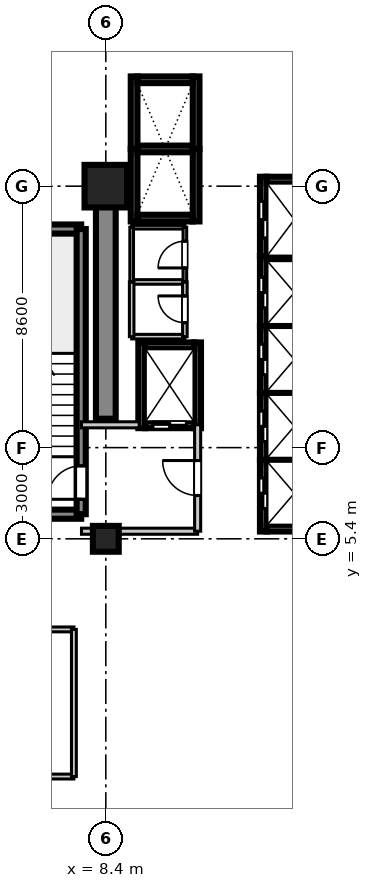
"""IFC4 building model, lengths in metres.
Left out: names, types, materials, properties, quantities, classifications, styles, units other than length and angle.
Written with IfcOpenShell. Run it as: python <this file> out.ifc"""

import sys

from ifc_helpers import new_model, si_unit, direction, frame, frame_2d, origin, origin_2d, place, context, subcontext, project, spatial, rectangle, extrude, source, transform, mapped, element, fill, save


model = new_model("IFC4")
c1 = context("Model", 3, precision=1e-05, world=origin(), true_north=direction((0.0, 1.0)))
c2 = subcontext(c1, "Body", "Model", "MODEL_VIEW")
j1 = project(units=[si_unit("LENGTHUNIT", "METRE"), si_unit("PLANEANGLEUNIT", "RADIAN")], contexts=[c1])
p1 = place(None, origin())
s1 = spatial("IfcSite", under=j1, at=p1, CompositionType="ELEMENT")
p2 = place(p1, origin())
s2 = spatial("IfcBuilding", under=s1, at=p2, CompositionType="ELEMENT")
p3 = place(p2, frame((0.0, 0.0, 39.7)))
s3 = spatial("IfcBuildingStorey", under=s2, at=p3, CompositionType="ELEMENT", Elevation=39.7)
m1 = source(origin(), c2, "Body", "SweptSolid", [
    extrude(rectangle(XDim=0.85, YDim=0.85, at=origin_2d()), origin(), (0.0, 0.0, 1.0), 3.605),
])
p4 = place(p3, frame((8.4, 5.4, 0.0), z_axis=(0.0, 0.0, 1.0), x_axis=(1.0, 0.0, 0.0)))
e1 = element("IfcColumn", 1, at=p4, inside=s3, PredefinedType="PILASTER", context=c2, shape_type="MappedRepresentation", body=[
    mapped(m1, transform((0.0, 0.0, 0.0), scale=1.0)),
])
m2 = source(origin(), c2, "Body", "SweptSolid", [
    extrude(rectangle(XDim=1.4, YDim=1.4, at=origin_2d()), origin(), (0.0, 0.0, 1.0), 3.605),
])
p5 = place(p3, frame((8.4, 17.0, 0.0), z_axis=(0.0, 0.0, 1.0), x_axis=(1.0, 0.0, 0.0)))
e2 = element("IfcColumn", 2, at=p5, inside=s3, PredefinedType="COLUMN", context=c2, shape_type="MappedRepresentation", body=[
    mapped(m2, transform((0.0, 0.0, 0.0), scale=1.0)),
])
m3 = source(origin(), c2, "Body", "SweptSolid", [
    extrude(rectangle(XDim=7.65, YDim=0.65, at=frame_2d((3.825, 0.0))), origin(), (0.0, 0.0, 1.0), 3.37),
])
p6 = place(p3, frame((8.4, 9.35, 0.0), z_axis=(0.0, 0.0, 1.0), x_axis=(0.0, 1.0, 0.0)))
e3 = element("IfcWall", 3, at=p6, inside=s3, PredefinedType="SHEAR", context=c2, shape_type="MappedRepresentation", body=[
    mapped(m3, transform((0.0, 0.0, 0.0), scale=1.0)),
])
m4 = source(origin(), c2, "Body", "SweptSolid", [
    extrude(rectangle(XDim=3.98, YDim=0.3, at=frame_2d((1.99, 0.0))), origin(), (0.0, 0.0, 1.0), 3.37),
])
for number, where, z_axis, x_axis in (
    (4, (3.61, 6.21, 0.0), (0.0, 0.0, 1.0), (1.0, 0.0, 0.0)),
    (5, (3.61, 15.59, 0.0), (0.0, 0.0, 1.0), (1.0, 0.0, 0.0)),
):
    element("IfcWall", number, at=place(p3, frame(where, z_axis=z_axis, x_axis=x_axis)), inside=s3, PredefinedType="SHEAR", context=c2, shape_type="MappedRepresentation", body=[
        mapped(m4, transform((0.0, 0.0, 0.0), scale=1.0)),
    ])
m5 = source(origin(), c2, "Body", "SweptSolid", [
    extrude(rectangle(XDim=9.38, YDim=0.3, at=frame_2d((4.69, 0.0))), origin(), (0.0, 0.0, 1.0), 3.37),
])
p7 = place(p3, frame((7.59, 6.21, 0.0), z_axis=(0.0, 0.0, 1.0), x_axis=(0.0, 1.0, 0.0)))
e6 = element("IfcWall", 6, at=p7, inside=s3, PredefinedType="SHEAR", context=c2, shape_type="MappedRepresentation", body=[
    mapped(m5, transform((0.0, 0.0, 0.0), scale=1.0)),
])
p8 = place(p7, frame((0.49, 0.0, 0.0)))
e7 = element("IfcOpeningElement", 7, at=p8, cuts=e6, PredefinedType="OPENING", context=c2, shape_type="SweptSolid", body=[
    extrude(rectangle(XDim=1.1, YDim=2.15, at=frame_2d((0.55, 1.075))), frame((0.0, 0.16, 0.0), z_axis=(0.0, -1.0, 0.0), x_axis=(1.0, 0.0, 0.0)), (0.0, 0.0, 1.0), 0.32),
])
m6 = source(origin(), c2, "Body", "SweptSolid", [
    extrude(rectangle(XDim=2.36, YDim=0.22, at=frame_2d((1.18, 0.0))), origin(), (0.0, 0.0, 1.0), 3.37),
])
p9 = place(p3, frame((13.58, 5.64, 0.0), z_axis=(0.0, 0.0, 1.0), x_axis=(0.0, 1.0, 0.0)))
e8 = element("IfcWall", 8, at=p9, inside=s3, PredefinedType="SHEAR", context=c2, shape_type="MappedRepresentation", body=[
    mapped(m6, transform((0.0, 0.0, 0.0), scale=1.0)),
])
p10 = place(p9, frame((0.76, 0.0, 0.0)))
e9 = element("IfcOpeningElement", 9, at=p10, cuts=e8, PredefinedType="OPENING", context=c2, shape_type="SweptSolid", body=[
    extrude(rectangle(XDim=1.0, YDim=2.2, at=frame_2d((0.5, 1.1))), frame((0.0, 0.12, 0.0), z_axis=(0.0, -1.0, 0.0), x_axis=(1.0, 0.0, 0.0)), (0.0, 0.0, 1.0), 0.24),
])
m7 = source(origin(), c2, "Body", "SweptSolid", [
    extrude(rectangle(XDim=1.82, YDim=0.22, at=frame_2d((0.91, 0.0))), origin(), (0.0, 0.0, 1.0), 3.37),
])
p11 = place(p3, frame((13.69, 5.75, 0.0), z_axis=(0.0, 0.0, 1.0), x_axis=(1.0, 0.0, 0.0)))
e10 = element("IfcWall", 10, at=p11, inside=s3, PredefinedType="SHEAR", context=c2, shape_type="MappedRepresentation", body=[
    mapped(m7, transform((0.0, 0.0, 0.0), scale=1.0)),
])
m8 = source(origin(), c2, "Body", "SweptSolid", [
    extrude(rectangle(XDim=1.82, YDim=0.22, at=frame_2d((0.91, 0.0))), origin(), (0.0, 0.0, 1.0), 3.65),
])
p12 = place(p3, frame((13.69, 8.0, 0.0), z_axis=(0.0, 0.0, 1.0), x_axis=(1.0, 0.0, 0.0)))
e11 = element("IfcWall", 11, at=p12, inside=s3, PredefinedType="SHEAR", context=c2, shape_type="MappedRepresentation", body=[
    mapped(m8, transform((0.0, 0.0, 0.0), scale=1.0)),
])
m9 = source(origin(), c2, "Body", "SweptSolid", [
    extrude(rectangle(XDim=2.2, YDim=0.22, at=frame_2d((1.1, 0.0))), origin(), (0.0, 0.0, 1.0), 3.37),
])
p13 = place(p3, frame((13.58, 8.0, 0.0), z_axis=(0.0, 0.0, 1.0), x_axis=(0.0, 1.0, 0.0)))
e12 = element("IfcWall", 12, at=p13, inside=s3, PredefinedType="SHEAR", context=c2, shape_type="MappedRepresentation", body=[
    mapped(m9, transform((0.0, 0.0, 0.0), scale=1.0)),
])
p14 = place(p13, frame((0.6, 0.0, 0.0)))
e13 = element("IfcOpeningElement", 13, at=p14, cuts=e12, PredefinedType="OPENING", context=c2, shape_type="SweptSolid", body=[
    extrude(rectangle(XDim=1.0, YDim=2.2, at=frame_2d((0.5, 1.1))), frame((0.0, 0.12, 0.0), z_axis=(0.0, -1.0, 0.0), x_axis=(1.0, 0.0, 0.0)), (0.0, 0.0, 1.0), 0.24),
])
p15 = place(p3, frame((13.69, 10.2, 0.0), z_axis=(0.0, 0.0, 1.0), x_axis=(1.0, 0.0, 0.0)))
e14 = element("IfcWall", 14, at=p15, inside=s3, PredefinedType="SHEAR", context=c2, shape_type="MappedRepresentation", body=[
    mapped(m8, transform((0.0, 0.0, 0.0), scale=1.0)),
])
p16 = place(p3, frame((13.58, 10.2, 0.0), z_axis=(0.0, 0.0, 1.0), x_axis=(0.0, 1.0, 0.0)))
e15 = element("IfcWall", 15, at=p16, inside=s3, PredefinedType="SHEAR", context=c2, shape_type="MappedRepresentation", body=[
    mapped(m9, transform((0.0, 0.0, 0.0), scale=1.0)),
])
p17 = place(p16, frame((0.6, 0.0, 0.0)))
e16 = element("IfcOpeningElement", 16, at=p17, cuts=e15, PredefinedType="OPENING", context=c2, shape_type="SweptSolid", body=[
    extrude(rectangle(XDim=1.0, YDim=2.2, at=frame_2d((0.5, 1.1))), frame((0.0, 0.12, 0.0), z_axis=(0.0, -1.0, 0.0), x_axis=(1.0, 0.0, 0.0)), (0.0, 0.0, 1.0), 0.24),
])
p18 = place(p3, frame((13.69, 12.4, 0.0), z_axis=(0.0, 0.0, 1.0), x_axis=(1.0, 0.0, 0.0)))
e17 = element("IfcWall", 17, at=p18, inside=s3, PredefinedType="SHEAR", context=c2, shape_type="MappedRepresentation", body=[
    mapped(m8, transform((0.0, 0.0, 0.0), scale=1.0)),
])
m10 = source(origin(), c2, "Body", "SweptSolid", [
    extrude(rectangle(XDim=2.3, YDim=0.22, at=frame_2d((1.15, 0.0))), origin(), (0.0, 0.0, 1.0), 3.37),
])
p19 = place(p3, frame((13.58, 12.4, 0.0), z_axis=(0.0, 0.0, 1.0), x_axis=(0.0, 1.0, 0.0)))
e18 = element("IfcWall", 18, at=p19, inside=s3, PredefinedType="SHEAR", context=c2, shape_type="MappedRepresentation", body=[
    mapped(m10, transform((0.0, 0.0, 0.0), scale=1.0)),
])
p20 = place(p19, frame((0.6, 0.0, 0.0)))
e19 = element("IfcOpeningElement", 19, at=p20, cuts=e18, PredefinedType="OPENING", context=c2, shape_type="SweptSolid", body=[
    extrude(rectangle(XDim=1.0, YDim=2.2, at=frame_2d((0.5, 1.1))), frame((0.0, 0.12, 0.0), z_axis=(0.0, -1.0, 0.0), x_axis=(1.0, 0.0, 0.0)), (0.0, 0.0, 1.0), 0.24),
])
p21 = place(p3, frame((13.69, 14.7, 0.0), z_axis=(0.0, 0.0, 1.0), x_axis=(1.0, 0.0, 0.0)))
e20 = element("IfcWall", 20, at=p21, inside=s3, PredefinedType="SHEAR", context=c2, shape_type="MappedRepresentation", body=[
    mapped(m8, transform((0.0, 0.0, 0.0), scale=1.0)),
])
m11 = source(origin(), c2, "Body", "SweptSolid", [
    extrude(rectangle(XDim=2.385, YDim=0.22, at=frame_2d((1.192, 0.0))), origin(), (0.0, 0.0, 1.0), 3.37),
])
for number, where, z_axis, x_axis in (
    (21, (9.33, 15.84, 0.0), (0.0, 0.0, 1.0), (0.0, 1.0, 0.0)),
    (22, (11.37, 15.84, 0.0), (0.0, 0.0, 1.0), (0.0, 1.0, 0.0)),
):
    element("IfcWall", number, at=place(p3, frame(where, z_axis=z_axis, x_axis=x_axis)), inside=s3, PredefinedType="SHEAR", context=c2, shape_type="MappedRepresentation", body=[
        mapped(m11, transform((0.0, 0.0, 0.0), scale=1.0)),
    ])
p22 = place(p3, frame((9.44, 15.95, 0.0), z_axis=(0.0, 0.0, 1.0), x_axis=(1.0, 0.0, 0.0)))
e23 = element("IfcWall", 23, at=p22, inside=s3, PredefinedType="SHEAR", context=c2, shape_type="MappedRepresentation", body=[
    mapped(m7, transform((0.0, 0.0, 0.0), scale=1.0)),
])
p23 = place(p3, frame((9.44, 18.225, 0.0), z_axis=(0.0, 0.0, 1.0), x_axis=(1.0, 0.0, 0.0)))
e24 = element("IfcWall", 24, at=p23, inside=s3, PredefinedType="SHEAR", context=c2, shape_type="MappedRepresentation", body=[
    mapped(m8, transform((0.0, 0.0, 0.0), scale=1.0)),
])
for number, where, z_axis, x_axis in (
    (25, (9.33, 18.225, 0.0), (0.0, 0.0, 1.0), (0.0, 1.0, 0.0)),
    (26, (11.37, 18.225, 0.0), (0.0, 0.0, 1.0), (0.0, 1.0, 0.0)),
):
    element("IfcWall", number, at=place(p3, frame(where, z_axis=z_axis, x_axis=x_axis)), inside=s3, PredefinedType="SHEAR", context=c2, shape_type="MappedRepresentation", body=[
        mapped(m11, transform((0.0, 0.0, 0.0), scale=1.0)),
    ])
p24 = place(p3, frame((9.44, 20.5, 0.0), z_axis=(0.0, 0.0, 1.0), x_axis=(1.0, 0.0, 0.0)))
e27 = element("IfcWall", 27, at=p24, inside=s3, PredefinedType="SHEAR", context=c2, shape_type="MappedRepresentation", body=[
    mapped(m7, transform((0.0, 0.0, 0.0), scale=1.0)),
])
m12 = source(origin(), c2, "Body", "SweptSolid", [
    extrude(rectangle(XDim=2.82, YDim=0.22, at=frame_2d((1.41, 0.0))), origin(), (0.0, 0.0, 1.0), 3.37),
])
for number, where, z_axis, x_axis in (
    (28, (9.58, 9.04, 0.0), (0.0, 0.0, 1.0), (0.0, 1.0, 0.0)),
    (29, (11.42, 9.04, 0.0), (0.0, 0.0, 1.0), (0.0, 1.0, 0.0)),
):
    element("IfcWall", number, at=place(p3, frame(where, z_axis=z_axis, x_axis=x_axis)), inside=s3, PredefinedType="SHEAR", context=c2, shape_type="MappedRepresentation", body=[
        mapped(m12, transform((0.0, 0.0, 0.0), scale=1.0)),
    ])
m13 = source(origin(), c2, "Body", "SweptSolid", [
    extrude(rectangle(XDim=1.62, YDim=0.22, at=frame_2d((0.81, 0.0))), origin(), (0.0, 0.0, 1.0), 3.37),
])
p25 = place(p3, frame((9.69, 9.15, 0.0), z_axis=(0.0, 0.0, 1.0), x_axis=(1.0, 0.0, 0.0)))
e30 = element("IfcWall", 30, at=p25, inside=s3, PredefinedType="SHEAR", context=c2, shape_type="MappedRepresentation", body=[
    mapped(m13, transform((0.0, 0.0, 0.0), scale=1.0)),
])
p26 = place(p25, frame((0.26, 0.0, 0.0)))
e31 = element("IfcOpeningElement", 31, at=p26, cuts=e30, PredefinedType="OPENING", context=c2, shape_type="SweptSolid", body=[
    extrude(rectangle(XDim=1.1, YDim=2.2, at=frame_2d((0.55, 1.1))), frame((0.0, 0.12, 0.0), z_axis=(0.0, -1.0, 0.0), x_axis=(1.0, 0.0, 0.0)), (0.0, 0.0, 1.0), 0.24),
])
p27 = place(p3, frame((9.69, 11.75, 0.0), z_axis=(0.0, 0.0, 1.0), x_axis=(1.0, 0.0, 0.0)))
e32 = element("IfcWall", 32, at=p27, inside=s3, PredefinedType="SHEAR", context=c2, shape_type="MappedRepresentation", body=[
    mapped(m13, transform((0.0, 0.0, 0.0), scale=1.0)),
])
m14 = source(origin(), c2, "Body", "SweptSolid", [
    extrude(rectangle(XDim=2.61, YDim=0.22, at=frame_2d((1.305, 0.0))), origin(), (0.0, 0.0, 1.0), 3.37),
])
p28 = place(p3, frame((13.58, 14.7, 0.0), z_axis=(0.0, 0.0, 1.0), x_axis=(0.0, 1.0, 0.0)))
e33 = element("IfcWall", 33, at=p28, inside=s3, PredefinedType="SHEAR", context=c2, shape_type="MappedRepresentation", body=[
    mapped(m14, transform((0.0, 0.0, 0.0), scale=1.0)),
])
p29 = place(p28, frame((0.6, 0.0, 0.0)))
e34 = element("IfcOpeningElement", 34, at=p29, cuts=e33, PredefinedType="OPENING", context=c2, shape_type="SweptSolid", body=[
    extrude(rectangle(XDim=1.2, YDim=2.2, at=frame_2d((0.6, 1.1))), frame((0.0, 0.12, 0.0), z_axis=(0.0, -1.0, 0.0), x_axis=(1.0, 0.0, 0.0)), (0.0, 0.0, 1.0), 0.24),
])
p30 = place(p3, frame((13.69, 17.2, 0.0), z_axis=(0.0, 0.0, 1.0), x_axis=(1.0, 0.0, 0.0)))
e35 = element("IfcWall", 35, at=p30, inside=s3, PredefinedType="SHEAR", context=c2, shape_type="MappedRepresentation", body=[
    mapped(m7, transform((0.0, 0.0, 0.0), scale=1.0)),
])
m15 = source(origin(), c2, "Body", "SweptSolid", [
    extrude(rectangle(XDim=3.82, YDim=0.2, at=frame_2d((1.91, 0.0))), origin(), (0.0, 0.0, 1.0), 2.71),
])
p31 = place(p3, frame((7.6, 5.65, 0.0), z_axis=(0.0, 0.0, 1.0), x_axis=(1.0, 0.0, 0.0)))
e36 = element("IfcWall", 36, at=p31, inside=s3, PredefinedType="PARTITIONING", context=c2, shape_type="MappedRepresentation", body=[
    mapped(m15, transform((0.0, 0.0, 0.0), scale=1.0)),
])
m16 = source(origin(), c2, "Body", "SweptSolid", [
    extrude(rectangle(XDim=1.9, YDim=0.2, at=frame_2d((0.95, 0.0))), origin(), (0.0, 0.0, 1.0), 2.71),
])
p32 = place(p3, frame((7.6, 9.15, 0.0), z_axis=(0.0, 0.0, 1.0), x_axis=(1.0, 0.0, 0.0)))
e37 = element("IfcWall", 37, at=p32, inside=s3, PredefinedType="PARTITIONING", context=c2, shape_type="MappedRepresentation", body=[
    mapped(m16, transform((0.0, 0.0, 0.0), scale=1.0)),
])
m17 = source(origin(), c2, "Body", "SweptSolid", [
    extrude(rectangle(XDim=3.5, YDim=0.2, at=frame_2d((1.75, 0.0))), origin(), (0.0, 0.0, 1.0), 2.71),
])
p33 = place(p3, frame((11.42, 5.65, 0.0), z_axis=(0.0, 0.0, 1.0), x_axis=(0.0, 1.0, 0.0)))
e38 = element("IfcWall", 38, at=p33, inside=s3, PredefinedType="PARTITIONING", context=c2, shape_type="MappedRepresentation", body=[
    mapped(m17, transform((0.0, 0.0, 0.0), scale=1.0)),
])
p34 = place(p33, frame((1.175, 0.0, 0.0)))
e39 = element("IfcOpeningElement", 39, at=p34, cuts=e38, PredefinedType="OPENING", context=c2, shape_type="SweptSolid", body=[
    extrude(rectangle(XDim=1.15, YDim=2.15, at=frame_2d((0.575, 1.075))), frame((0.0, 0.11, 0.0), z_axis=(0.0, -1.0, 0.0), x_axis=(1.0, 0.0, 0.0)), (0.0, 0.0, 1.0), 0.22),
])
m18 = source(origin(), c2, "Body", "SweptSolid", [
    extrude(rectangle(XDim=1.75, YDim=0.15, at=frame_2d((0.875, 0.0))), origin(), (0.0, 0.0, 1.0), 2.71),
])
for number, where, z_axis, x_axis in (
    (40, (9.25, 12.05, 0.0), (0.0, 0.0, 1.0), (1.0, 0.0, 0.0)),
    (41, (9.25, 13.85, 0.0), (0.0, 0.0, 1.0), (1.0, 0.0, 0.0)),
):
    element("IfcWall", number, at=place(p3, frame(where, z_axis=z_axis, x_axis=x_axis)), inside=s3, PredefinedType="PARTITIONING", context=c2, shape_type="MappedRepresentation", body=[
        mapped(m18, transform((0.0, 0.0, 0.0), scale=1.0)),
    ])
m19 = source(origin(), c2, "Body", "SweptSolid", [
    extrude(rectangle(XDim=1.8, YDim=0.15, at=frame_2d((0.9, 0.0))), origin(), (0.0, 0.0, 1.0), 2.71),
])
p35 = place(p3, frame((9.25, 12.05, 0.0), z_axis=(0.0, 0.0, 1.0), x_axis=(0.0, 1.0, 0.0)))
e42 = element("IfcWall", 42, at=p35, inside=s3, PredefinedType="PARTITIONING", context=c2, shape_type="MappedRepresentation", body=[
    mapped(m19, transform((0.0, 0.0, 0.0), scale=1.0)),
])
p36 = place(p3, frame((11.0, 12.05, 0.0), z_axis=(0.0, 0.0, 1.0), x_axis=(0.0, 1.0, 0.0)))
e43 = element("IfcWall", 43, at=p36, inside=s3, PredefinedType="PARTITIONING", context=c2, shape_type="MappedRepresentation", body=[
    mapped(m19, transform((0.0, 0.0, 0.0), scale=1.0)),
])
p37 = place(p36, frame((0.46, 0.0, 0.0)))
e44 = element("IfcOpeningElement", 44, at=p37, cuts=e43, PredefinedType="OPENING", context=c2, shape_type="SweptSolid", body=[
    extrude(rectangle(XDim=0.88, YDim=2.1, at=frame_2d((0.44, 1.05))), frame((0.0, 0.085, 0.0), z_axis=(0.0, -1.0, 0.0), x_axis=(1.0, 0.0, 0.0)), (0.0, 0.0, 1.0), 0.17),
])
m20 = source(origin(), c2, "Body", "SweptSolid", [
    extrude(rectangle(XDim=1.75, YDim=0.12, at=frame_2d((0.875, 0.0))), origin(), (0.0, 0.0, 1.0), 2.71),
])
p38 = place(p3, frame((9.25, 15.65, 0.0), z_axis=(0.0, 0.0, 1.0), x_axis=(1.0, 0.0, 0.0)))
e45 = element("IfcWall", 45, at=p38, inside=s3, PredefinedType="PARTITIONING", context=c2, shape_type="MappedRepresentation", body=[
    mapped(m20, transform((0.0, 0.0, 0.0), scale=1.0)),
])
m21 = source(origin(), c2, "Body", "SweptSolid", [
    extrude(rectangle(XDim=1.8, YDim=0.12, at=frame_2d((0.9, 0.0))), origin(), (0.0, 0.0, 1.0), 2.71),
])
p39 = place(p3, frame((9.25, 13.85, 0.0), z_axis=(0.0, 0.0, 1.0), x_axis=(0.0, 1.0, 0.0)))
e46 = element("IfcWall", 46, at=p39, inside=s3, PredefinedType="PARTITIONING", context=c2, shape_type="MappedRepresentation", body=[
    mapped(m21, transform((0.0, 0.0, 0.0), scale=1.0)),
])
p40 = place(p3, frame((11.0, 13.85, 0.0), z_axis=(0.0, 0.0, 1.0), x_axis=(0.0, 1.0, 0.0)))
e47 = element("IfcWall", 47, at=p40, inside=s3, PredefinedType="PARTITIONING", context=c2, shape_type="MappedRepresentation", body=[
    mapped(m21, transform((0.0, 0.0, 0.0), scale=1.0)),
])
p41 = place(p40, frame((0.46, 0.0, 0.0)))
e48 = element("IfcOpeningElement", 48, at=p41, cuts=e47, PredefinedType="OPENING", context=c2, shape_type="SweptSolid", body=[
    extrude(rectangle(XDim=0.88, YDim=2.1, at=frame_2d((0.44, 1.05))), frame((0.0, 0.07, 0.0), z_axis=(0.0, -1.0, 0.0), x_axis=(1.0, 0.0, 0.0)), (0.0, 0.0, 1.0), 0.14),
])
m22 = source(origin(), c2, "Body", "SweptSolid", [
    extrude(rectangle(XDim=18.4, YDim=0.16, at=frame_2d((9.2, 0.0))), origin(), (0.0, 0.0, 1.0), 2.71),
])
p42 = place(p3, frame((-11.05, -2.42, 0.0), z_axis=(0.0, 0.0, 1.0), x_axis=(1.0, 0.0, 0.0)))
e49 = element("IfcWall", 49, at=p42, inside=s3, PredefinedType="PARTITIONING", context=c2, shape_type="MappedRepresentation", body=[
    mapped(m22, transform((0.0, 0.0, 0.0), scale=1.0)),
])
p43 = place(p3, frame((-11.05, 2.42, 0.0), z_axis=(0.0, 0.0, 1.0), x_axis=(1.0, 0.0, 0.0)))
e50 = element("IfcWall", 50, at=p43, inside=s3, PredefinedType="PARTITIONING", context=c2, shape_type="MappedRepresentation", body=[
    mapped(m22, transform((0.0, 0.0, 0.0), scale=1.0)),
])
p44 = place(p43, frame((4.833, 0.0, 0.0)))
e51 = element("IfcOpeningElement", 51, at=p44, cuts=e50, PredefinedType="OPENING", context=c2, shape_type="SweptSolid", body=[
    extrude(rectangle(XDim=1.5, YDim=2.15, at=frame_2d((0.75, 1.075))), frame((0.0, 0.09, 0.0), z_axis=(0.0, -1.0, 0.0), x_axis=(1.0, 0.0, 0.0)), (0.0, 0.0, 1.0), 0.18),
])
m23 = source(origin(), c2, "Body", "SweptSolid", [
    extrude(rectangle(XDim=4.84, YDim=0.16, at=frame_2d((2.42, 0.0))), origin(), (0.0, 0.0, 1.0), 2.71),
])
p45 = place(p3, frame((7.35, -2.42, 0.0), z_axis=(0.0, 0.0, 1.0), x_axis=(0.0, 1.0, 0.0)))
e52 = element("IfcWall", 52, at=p45, inside=s3, PredefinedType="PARTITIONING", context=c2, shape_type="MappedRepresentation", body=[
    mapped(m23, transform((0.0, 0.0, 0.0), scale=1.0)),
])
m24 = source(origin(), c2, "Body", "SweptSolid", [
    extrude(rectangle(XDim=1.1, YDim=2.15, at=frame_2d((0.55, 1.075))), frame((0.0, 0.025, 0.0), z_axis=(0.0, -1.0, 0.0), x_axis=(1.0, 0.0, 0.0)), (0.0, 0.0, 1.0), 0.05),
])
p46 = place(p8, origin())
e53 = element("IfcDoor", 53, at=p46, inside=s3, OperationType="SINGLE_SWING_LEFT", PredefinedType="DOOR", context=c2, shape_type="MappedRepresentation", body=[
    mapped(m24, transform((0.0, 0.0, 0.0), scale=1.0)),
])
fill(e7, e53)
m25 = source(origin(), c2, "Body", "SweptSolid", [
    extrude(rectangle(XDim=1.0, YDim=2.2, at=frame_2d((0.5, 1.1))), frame((0.0, 0.025, 0.0), z_axis=(0.0, -1.0, 0.0), x_axis=(1.0, 0.0, 0.0)), (0.0, 0.0, 1.0), 0.05),
])
p47 = place(p10, origin())
e54 = element("IfcDoor", 54, at=p47, inside=s3, OperationType="DOUBLE_DOOR_SLIDING", PredefinedType="DOOR", context=c2, shape_type="MappedRepresentation", body=[
    mapped(m25, transform((0.0, 0.0, 0.0), scale=1.0)),
])
fill(e9, e54)
p48 = place(p14, origin())
e55 = element("IfcDoor", 55, at=p48, inside=s3, OperationType="DOUBLE_DOOR_SLIDING", PredefinedType="DOOR", context=c2, shape_type="MappedRepresentation", body=[
    mapped(m25, transform((0.0, 0.0, 0.0), scale=1.0)),
])
fill(e13, e55)
p49 = place(p17, origin())
e56 = element("IfcDoor", 56, at=p49, inside=s3, OperationType="DOUBLE_DOOR_SLIDING", PredefinedType="DOOR", context=c2, shape_type="MappedRepresentation", body=[
    mapped(m25, transform((0.0, 0.0, 0.0), scale=1.0)),
])
fill(e16, e56)
p50 = place(p20, origin())
e57 = element("IfcDoor", 57, at=p50, inside=s3, OperationType="DOUBLE_DOOR_SLIDING", PredefinedType="DOOR", context=c2, shape_type="MappedRepresentation", body=[
    mapped(m25, transform((0.0, 0.0, 0.0), scale=1.0)),
])
fill(e19, e57)
m26 = source(origin(), c2, "Body", "SweptSolid", [
    extrude(rectangle(XDim=1.1, YDim=2.2, at=frame_2d((0.55, 1.1))), frame((0.0, 0.025, 0.0), z_axis=(0.0, -1.0, 0.0), x_axis=(1.0, 0.0, 0.0)), (0.0, 0.0, 1.0), 0.05),
])
p51 = place(p26, frame((1.1, 0.0, 0.0), z_axis=(0.0, 0.0, 1.0), x_axis=(-1.0, 0.0, 0.0)))
e58 = element("IfcDoor", 58, at=p51, inside=s3, OperationType="DOUBLE_DOOR_SLIDING", PredefinedType="DOOR", context=c2, shape_type="MappedRepresentation", body=[
    mapped(m26, transform((0.0, 0.0, 0.0), scale=1.0)),
])
fill(e31, e58)
m27 = source(origin(), c2, "Body", "SweptSolid", [
    extrude(rectangle(XDim=1.2, YDim=2.2, at=frame_2d((0.6, 1.1))), frame((0.0, 0.025, 0.0), z_axis=(0.0, -1.0, 0.0), x_axis=(1.0, 0.0, 0.0)), (0.0, 0.0, 1.0), 0.05),
])
p52 = place(p29, origin())
e59 = element("IfcDoor", 59, at=p52, inside=s3, OperationType="DOUBLE_DOOR_SLIDING", PredefinedType="DOOR", context=c2, shape_type="MappedRepresentation", body=[
    mapped(m27, transform((0.0, 0.0, 0.0), scale=1.0)),
])
fill(e34, e59)
m28 = source(origin(), c2, "Body", "SweptSolid", [
    extrude(rectangle(XDim=1.15, YDim=2.15, at=frame_2d((0.575, 1.075))), frame((0.0, 0.025, 0.0), z_axis=(0.0, -1.0, 0.0), x_axis=(1.0, 0.0, 0.0)), (0.0, 0.0, 1.0), 0.05),
])
p53 = place(p34, frame((1.15, 0.0, 0.0), z_axis=(0.0, 0.0, 1.0), x_axis=(-1.0, 0.0, 0.0)))
e60 = element("IfcDoor", 60, at=p53, inside=s3, OperationType="SINGLE_SWING_RIGHT", PredefinedType="DOOR", context=c2, shape_type="MappedRepresentation", body=[
    mapped(m28, transform((0.0, 0.0, 0.0), scale=1.0)),
])
fill(e39, e60)
m29 = source(origin(), c2, "Body", "SweptSolid", [
    extrude(rectangle(XDim=0.88, YDim=2.1, at=frame_2d((0.44, 1.05))), frame((0.0, 0.025, 0.0), z_axis=(0.0, -1.0, 0.0), x_axis=(1.0, 0.0, 0.0)), (0.0, 0.0, 1.0), 0.05),
])
p54 = place(p37, origin())
e61 = element("IfcDoor", 61, at=p54, inside=s3, OperationType="SINGLE_SWING_RIGHT", PredefinedType="DOOR", context=c2, shape_type="MappedRepresentation", body=[
    mapped(m29, transform((0.0, 0.0, 0.0), scale=1.0)),
])
fill(e44, e61)
p55 = place(p41, origin())
e62 = element("IfcDoor", 62, at=p55, inside=s3, OperationType="SINGLE_SWING_LEFT", PredefinedType="DOOR", context=c2, shape_type="MappedRepresentation", body=[
    mapped(m29, transform((0.0, 0.0, 0.0), scale=1.0)),
])
fill(e48, e62)
save(model, sys.argv[1])
